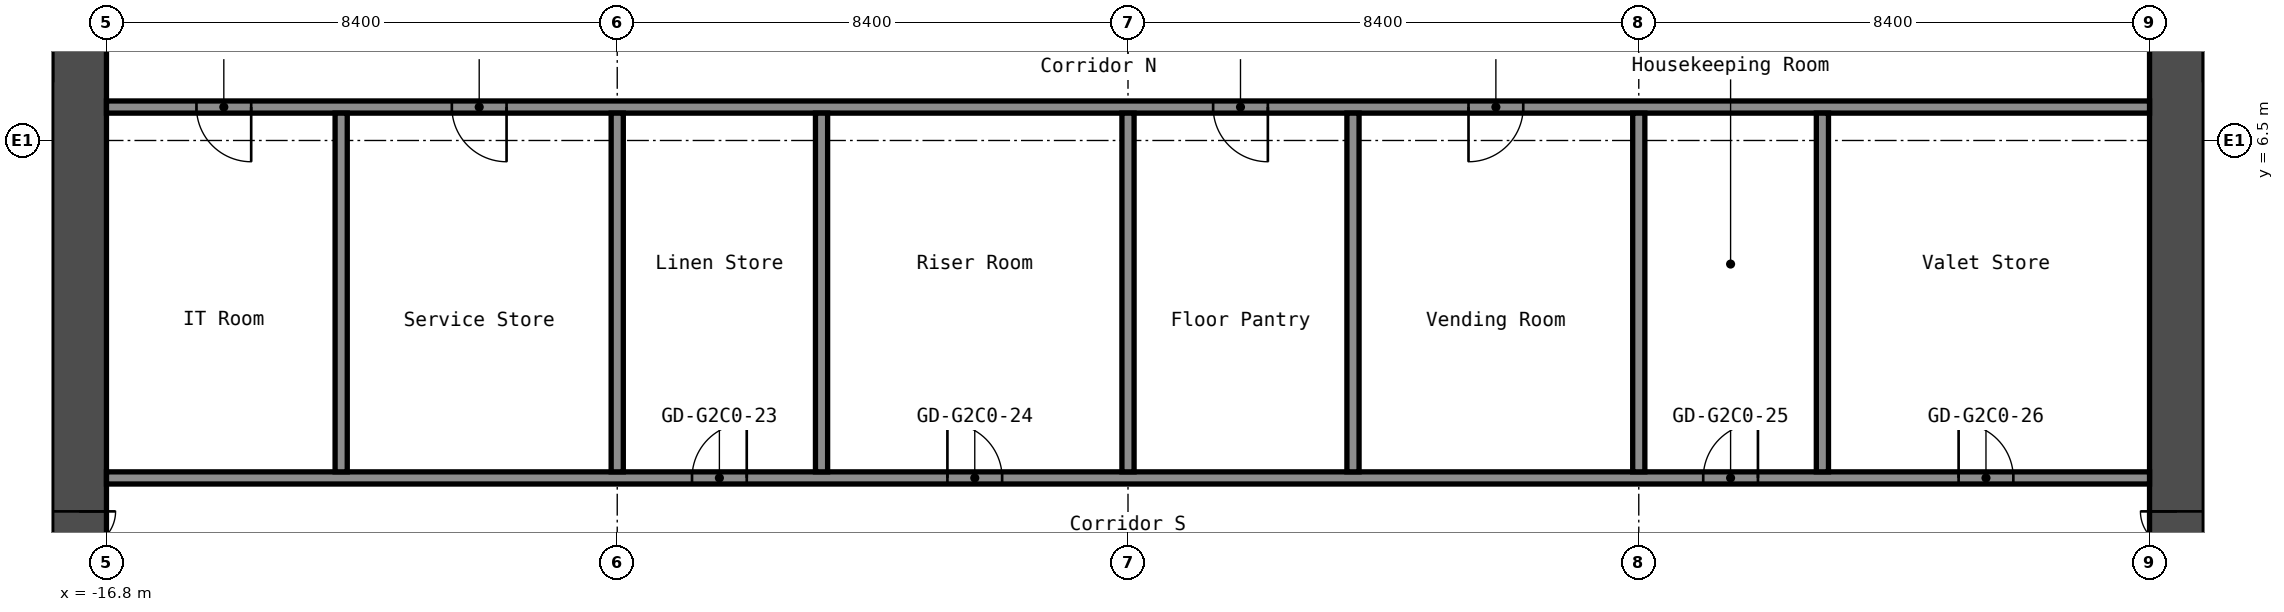
"""IFC4 building model, lengths in metres.
Left out: names, types, materials, properties, quantities, classifications, styles, units other than length and angle.
Written with IfcOpenShell. Run it as: python <this file> out.ifc"""

import sys

from ifc_helpers import new_model, si_unit, direction, frame, frame_2d, origin, place, context, subcontext, project, spatial, rectangle, extrude, element, fill, save


model = new_model("IFC4")
c1 = context("Model", 3, precision=1e-05, world=origin(), true_north=direction((0.0, 1.0)))
c2 = subcontext(c1, "Body", "Model", "MODEL_VIEW")
j1 = project(units=[si_unit("LENGTHUNIT", "METRE"), si_unit("PLANEANGLEUNIT", "RADIAN")], contexts=[c1])
p1 = place(None, origin())
s1 = spatial("IfcSite", under=j1, at=p1, CompositionType="ELEMENT")
p2 = place(p1, origin())
s2 = spatial("IfcBuilding", under=s1, at=p2, CompositionType="ELEMENT")
p3 = place(p2, frame((0.0, 0.0, 81.8)))
s3 = spatial("IfcBuildingStorey", under=s2, at=p3, CompositionType="ELEMENT", Elevation=81.8)
p4 = place(p3, frame((-17.25, -8.4, 0.0), z_axis=(0.0, 0.0, 1.0), x_axis=(0.0, 1.0, 0.0)))
e1 = element("IfcWall", 1, at=p4, inside=s3, PredefinedType="SHEAR", context=c2, shape_type="SweptSolid", body=[
    extrude(rectangle(XDim=16.8, YDim=0.9, at=frame_2d((8.4, 0.0))), origin(), (0.0, 0.0, 1.0), 2.8),
])
p5 = place(p4, frame((7.6, 0.0, 0.0)))
e2 = element("IfcOpeningElement", 2, at=p5, cuts=e1, PredefinedType="OPENING", context=c2, shape_type="SweptSolid", body=[
    extrude(rectangle(XDim=1.2, YDim=2.1, at=frame_2d((0.6, 1.05))), frame((0.0, 0.46, 0.0), z_axis=(0.0, -1.0, 0.0), x_axis=(1.0, 0.0, 0.0)), (0.0, 0.0, 1.0), 0.92),
])
p6 = place(p3, frame((-32.7, 7.95, 0.0), z_axis=(0.0, 0.0, 1.0), x_axis=(1.0, 0.0, 0.0)))
e3 = element("IfcWall", 3, at=p6, inside=s3, PredefinedType="SHEAR", context=c2, shape_type="SweptSolid", body=[
    extrude(rectangle(XDim=15.0, YDim=0.9, at=frame_2d((7.5, 0.0))), origin(), (0.0, 0.0, 1.0), 2.8),
])
p7 = place(p6, frame((3.4, 0.0, 0.0)))
e4 = element("IfcOpeningElement", 4, at=p7, cuts=e3, PredefinedType="OPENING", context=c2, shape_type="SweptSolid", body=[
    extrude(rectangle(XDim=1.2, YDim=2.1, at=frame_2d((0.6, 1.05))), frame((0.0, 0.46, 0.0), z_axis=(0.0, -1.0, 0.0), x_axis=(1.0, 0.0, 0.0)), (0.0, 0.0, 1.0), 0.92),
])
p8 = place(p6, frame((0.75, 0.0, 0.0)))
e5 = element("IfcOpeningElement", 5, at=p8, cuts=e3, PredefinedType="OPENING", context=c2, shape_type="SweptSolid", body=[
    extrude(rectangle(XDim=0.9, YDim=2.1, at=frame_2d((0.45, 1.05))), frame((0.0, 0.46, 0.0), z_axis=(0.0, -1.0, 0.0), x_axis=(1.0, 0.0, 0.0)), (0.0, 0.0, 1.0), 0.92),
])
p9 = place(p3, frame((17.25, -8.4, 0.0), z_axis=(0.0, 0.0, 1.0), x_axis=(0.0, 1.0, 0.0)))
e6 = element("IfcWall", 6, at=p9, inside=s3, PredefinedType="SHEAR", context=c2, shape_type="SweptSolid", body=[
    extrude(rectangle(XDim=16.8, YDim=0.9, at=frame_2d((8.4, 0.0))), origin(), (0.0, 0.0, 1.0), 2.8),
])
p10 = place(p9, frame((7.6, 0.0, 0.0)))
e7 = element("IfcOpeningElement", 7, at=p10, cuts=e6, PredefinedType="OPENING", context=c2, shape_type="SweptSolid", body=[
    extrude(rectangle(XDim=1.2, YDim=2.1, at=frame_2d((0.6, 1.05))), frame((0.0, 0.46, 0.0), z_axis=(0.0, -1.0, 0.0), x_axis=(1.0, 0.0, 0.0)), (0.0, 0.0, 1.0), 0.92),
])
p11 = place(p3, frame((17.7, 7.95, 0.0), z_axis=(0.0, 0.0, 1.0), x_axis=(1.0, 0.0, 0.0)))
e8 = element("IfcWall", 8, at=p11, inside=s3, PredefinedType="SHEAR", context=c2, shape_type="SweptSolid", body=[
    extrude(rectangle(XDim=15.0, YDim=0.9, at=frame_2d((7.5, 0.0))), origin(), (0.0, 0.0, 1.0), 2.8),
])
p12 = place(p11, frame((10.4, 0.0, 0.0)))
e9 = element("IfcOpeningElement", 9, at=p12, cuts=e8, PredefinedType="OPENING", context=c2, shape_type="SweptSolid", body=[
    extrude(rectangle(XDim=1.2, YDim=2.1, at=frame_2d((0.6, 1.05))), frame((0.0, 0.46, 0.0), z_axis=(0.0, -1.0, 0.0), x_axis=(1.0, 0.0, 0.0)), (0.0, 0.0, 1.0), 0.92),
])
p13 = place(p11, frame((13.35, 0.0, 0.0)))
e10 = element("IfcOpeningElement", 10, at=p13, cuts=e8, PredefinedType="OPENING", context=c2, shape_type="SweptSolid", body=[
    extrude(rectangle(XDim=0.9, YDim=2.1, at=frame_2d((0.45, 1.05))), frame((0.0, 0.46, 0.0), z_axis=(0.0, -1.0, 0.0), x_axis=(1.0, 0.0, 0.0)), (0.0, 0.0, 1.0), 0.92),
])
p14 = place(p3, frame((-16.8, 0.95, 0.0), z_axis=(0.0, 0.0, 1.0), x_axis=(1.0, 0.0, 0.0)))
e11 = element("IfcWall", 11, at=p14, inside=s3, PredefinedType="PARTITIONING", context=c2, shape_type="SweptSolid", body=[
    extrude(rectangle(XDim=33.6, YDim=0.2, at=frame_2d((16.8, 0.0))), origin(), (0.0, 0.0, 1.0), 2.8),
])
p15 = place(p14, frame((9.63, 0.0, 0.0)))
e12 = element("IfcOpeningElement", 12, at=p15, cuts=e11, PredefinedType="OPENING", context=c2, shape_type="SweptSolid", body=[
    extrude(rectangle(XDim=0.9, YDim=2.1, at=frame_2d((0.45, 1.05))), frame((0.0, 0.11, 0.0), z_axis=(0.0, -1.0, 0.0), x_axis=(1.0, 0.0, 0.0)), (0.0, 0.0, 1.0), 0.22),
])
p16 = place(p14, frame((13.83, 0.0, 0.0)))
e13 = element("IfcOpeningElement", 13, at=p16, cuts=e11, PredefinedType="OPENING", context=c2, shape_type="SweptSolid", body=[
    extrude(rectangle(XDim=0.9, YDim=2.1, at=frame_2d((0.45, 1.05))), frame((0.0, 0.11, 0.0), z_axis=(0.0, -1.0, 0.0), x_axis=(1.0, 0.0, 0.0)), (0.0, 0.0, 1.0), 0.22),
])
p17 = place(p14, frame((26.26, 0.0, 0.0)))
e14 = element("IfcOpeningElement", 14, at=p17, cuts=e11, PredefinedType="OPENING", context=c2, shape_type="SweptSolid", body=[
    extrude(rectangle(XDim=0.9, YDim=2.1, at=frame_2d((0.45, 1.05))), frame((0.0, 0.11, 0.0), z_axis=(0.0, -1.0, 0.0), x_axis=(1.0, 0.0, 0.0)), (0.0, 0.0, 1.0), 0.22),
])
p18 = place(p14, frame((30.46, 0.0, 0.0)))
e15 = element("IfcOpeningElement", 15, at=p18, cuts=e11, PredefinedType="OPENING", context=c2, shape_type="SweptSolid", body=[
    extrude(rectangle(XDim=0.9, YDim=2.1, at=frame_2d((0.45, 1.05))), frame((0.0, 0.11, 0.0), z_axis=(0.0, -1.0, 0.0), x_axis=(1.0, 0.0, 0.0)), (0.0, 0.0, 1.0), 0.22),
])
p19 = place(p3, frame((-16.8, 7.05, 0.0), z_axis=(0.0, 0.0, 1.0), x_axis=(1.0, 0.0, 0.0)))
e16 = element("IfcWall", 16, at=p19, inside=s3, PredefinedType="PARTITIONING", context=c2, shape_type="SweptSolid", body=[
    extrude(rectangle(XDim=33.6, YDim=0.2, at=frame_2d((16.8, 0.0))), origin(), (0.0, 0.0, 1.0), 2.8),
])
p20 = place(p19, frame((1.48, 0.0, 0.0)))
e17 = element("IfcOpeningElement", 17, at=p20, cuts=e16, PredefinedType="OPENING", context=c2, shape_type="SweptSolid", body=[
    extrude(rectangle(XDim=0.9, YDim=2.1, at=frame_2d((0.45, 1.05))), frame((0.0, 0.11, 0.0), z_axis=(0.0, -1.0, 0.0), x_axis=(1.0, 0.0, 0.0)), (0.0, 0.0, 1.0), 0.22),
])
p21 = place(p19, frame((5.68, 0.0, 0.0)))
e18 = element("IfcOpeningElement", 18, at=p21, cuts=e16, PredefinedType="OPENING", context=c2, shape_type="SweptSolid", body=[
    extrude(rectangle(XDim=0.9, YDim=2.1, at=frame_2d((0.45, 1.05))), frame((0.0, 0.11, 0.0), z_axis=(0.0, -1.0, 0.0), x_axis=(1.0, 0.0, 0.0)), (0.0, 0.0, 1.0), 0.22),
])
p22 = place(p19, frame((18.2, 0.0, 0.0)))
e19 = element("IfcOpeningElement", 19, at=p22, cuts=e16, PredefinedType="OPENING", context=c2, shape_type="SweptSolid", body=[
    extrude(rectangle(XDim=0.9, YDim=2.1, at=frame_2d((0.45, 1.05))), frame((0.0, 0.11, 0.0), z_axis=(0.0, -1.0, 0.0), x_axis=(1.0, 0.0, 0.0)), (0.0, 0.0, 1.0), 0.22),
])
p23 = place(p19, frame((22.4, 0.0, 0.0)))
e20 = element("IfcOpeningElement", 20, at=p23, cuts=e16, PredefinedType="OPENING", context=c2, shape_type="SweptSolid", body=[
    extrude(rectangle(XDim=0.9, YDim=2.1, at=frame_2d((0.45, 1.05))), frame((0.0, 0.11, 0.0), z_axis=(0.0, -1.0, 0.0), x_axis=(1.0, 0.0, 0.0)), (0.0, 0.0, 1.0), 0.22),
])
for number, where, z_axis, x_axis in (
    (21, (-12.94, 1.05, 0.0), (0.0, 0.0, 1.0), (0.0, 1.0, 0.0)),
    (22, (-8.4, 1.05, 0.0), (0.0, 0.0, 1.0), (0.0, 1.0, 0.0)),
    (23, (-5.04, 1.05, 0.0), (0.0, 0.0, 1.0), (0.0, 1.0, 0.0)),
    (24, (0.0, 1.05, 0.0), (0.0, 0.0, 1.0), (0.0, 1.0, 0.0)),
    (25, (3.7, 1.05, 0.0), (0.0, 0.0, 1.0), (0.0, 1.0, 0.0)),
    (26, (8.4, 1.05, 0.0), (0.0, 0.0, 1.0), (0.0, 1.0, 0.0)),
    (27, (11.42, 1.05, 0.0), (0.0, 0.0, 1.0), (0.0, 1.0, 0.0)),
):
    element("IfcWall", number, at=place(p3, frame(where, z_axis=z_axis, x_axis=x_axis)), inside=s3, PredefinedType="PARTITIONING", context=c2, shape_type="SweptSolid", body=[
        extrude(rectangle(XDim=5.9, YDim=0.2, at=frame_2d((2.95, 0.0))), origin(), (0.0, 0.0, 1.0), 2.8),
    ])
p24 = place(p5, origin())
e28 = element("IfcDoor", 28, at=p24, inside=s3, OperationType="DOUBLE_DOOR_SINGLE_SWING", PredefinedType="DOOR", context=c2, shape_type="SweptSolid", body=[
    extrude(rectangle(XDim=1.2, YDim=2.1, at=frame_2d((0.6, 1.05))), frame((0.0, 0.025, 0.0), z_axis=(0.0, -1.0, 0.0), x_axis=(1.0, 0.0, 0.0)), (0.0, 0.0, 1.0), 0.05),
])
fill(e2, e28)
p25 = place(p10, origin())
e29 = element("IfcDoor", 29, at=p25, inside=s3, OperationType="DOUBLE_DOOR_SINGLE_SWING", PredefinedType="DOOR", context=c2, shape_type="SweptSolid", body=[
    extrude(rectangle(XDim=1.2, YDim=2.1, at=frame_2d((0.6, 1.05))), frame((0.0, 0.025, 0.0), z_axis=(0.0, -1.0, 0.0), x_axis=(1.0, 0.0, 0.0)), (0.0, 0.0, 1.0), 0.05),
])
fill(e7, e29)
p26 = place(p15, origin())
e30 = element("IfcDoor", 30, at=p26, inside=s3, OperationType="SINGLE_SWING_LEFT", PredefinedType="DOOR", context=c2, shape_type="SweptSolid", body=[
    extrude(rectangle(XDim=0.9, YDim=2.1, at=frame_2d((0.45, 1.05))), frame((0.0, 0.025, 0.0), z_axis=(0.0, -1.0, 0.0), x_axis=(1.0, 0.0, 0.0)), (0.0, 0.0, 1.0), 0.05),
])
fill(e12, e30)
p27 = place(p16, origin())
e31 = element("IfcDoor", 31, at=p27, inside=s3, OperationType="SINGLE_SWING_RIGHT", PredefinedType="DOOR", context=c2, shape_type="SweptSolid", body=[
    extrude(rectangle(XDim=0.9, YDim=2.1, at=frame_2d((0.45, 1.05))), frame((0.0, 0.025, 0.0), z_axis=(0.0, -1.0, 0.0), x_axis=(1.0, 0.0, 0.0)), (0.0, 0.0, 1.0), 0.05),
])
fill(e13, e31)
p28 = place(p17, origin())
e32 = element("IfcDoor", 32, at=p28, inside=s3, OperationType="SINGLE_SWING_LEFT", PredefinedType="DOOR", context=c2, shape_type="SweptSolid", body=[
    extrude(rectangle(XDim=0.9, YDim=2.1, at=frame_2d((0.45, 1.05))), frame((0.0, 0.025, 0.0), z_axis=(0.0, -1.0, 0.0), x_axis=(1.0, 0.0, 0.0)), (0.0, 0.0, 1.0), 0.05),
])
fill(e14, e32)
p29 = place(p18, origin())
e33 = element("IfcDoor", 33, at=p29, inside=s3, OperationType="SINGLE_SWING_RIGHT", PredefinedType="DOOR", context=c2, shape_type="SweptSolid", body=[
    extrude(rectangle(XDim=0.9, YDim=2.1, at=frame_2d((0.45, 1.05))), frame((0.0, 0.025, 0.0), z_axis=(0.0, -1.0, 0.0), x_axis=(1.0, 0.0, 0.0)), (0.0, 0.0, 1.0), 0.05),
])
fill(e15, e33)
p30 = place(p20, origin())
e34 = element("IfcDoor", 34, at=p30, inside=s3, OperationType="SINGLE_SWING_RIGHT", PredefinedType="DOOR", context=c2, shape_type="SweptSolid", body=[
    extrude(rectangle(XDim=0.9, YDim=2.1, at=frame_2d((0.45, 1.05))), frame((0.0, 0.025, 0.0), z_axis=(0.0, -1.0, 0.0), x_axis=(1.0, 0.0, 0.0)), (0.0, 0.0, 1.0), 0.05),
])
fill(e17, e34)
p31 = place(p21, origin())
e35 = element("IfcDoor", 35, at=p31, inside=s3, OperationType="SINGLE_SWING_RIGHT", PredefinedType="DOOR", context=c2, shape_type="SweptSolid", body=[
    extrude(rectangle(XDim=0.9, YDim=2.1, at=frame_2d((0.45, 1.05))), frame((0.0, 0.025, 0.0), z_axis=(0.0, -1.0, 0.0), x_axis=(1.0, 0.0, 0.0)), (0.0, 0.0, 1.0), 0.05),
])
fill(e18, e35)
p32 = place(p22, origin())
e36 = element("IfcDoor", 36, at=p32, inside=s3, OperationType="SINGLE_SWING_RIGHT", PredefinedType="DOOR", context=c2, shape_type="SweptSolid", body=[
    extrude(rectangle(XDim=0.9, YDim=2.1, at=frame_2d((0.45, 1.05))), frame((0.0, 0.025, 0.0), z_axis=(0.0, -1.0, 0.0), x_axis=(1.0, 0.0, 0.0)), (0.0, 0.0, 1.0), 0.05),
])
fill(e19, e36)
p33 = place(p23, origin())
e37 = element("IfcDoor", 37, at=p33, inside=s3, OperationType="SINGLE_SWING_LEFT", PredefinedType="DOOR", context=c2, shape_type="SweptSolid", body=[
    extrude(rectangle(XDim=0.9, YDim=2.1, at=frame_2d((0.45, 1.05))), frame((0.0, 0.025, 0.0), z_axis=(0.0, -1.0, 0.0), x_axis=(1.0, 0.0, 0.0)), (0.0, 0.0, 1.0), 0.05),
])
fill(e20, e37)
save(model, sys.argv[1])
